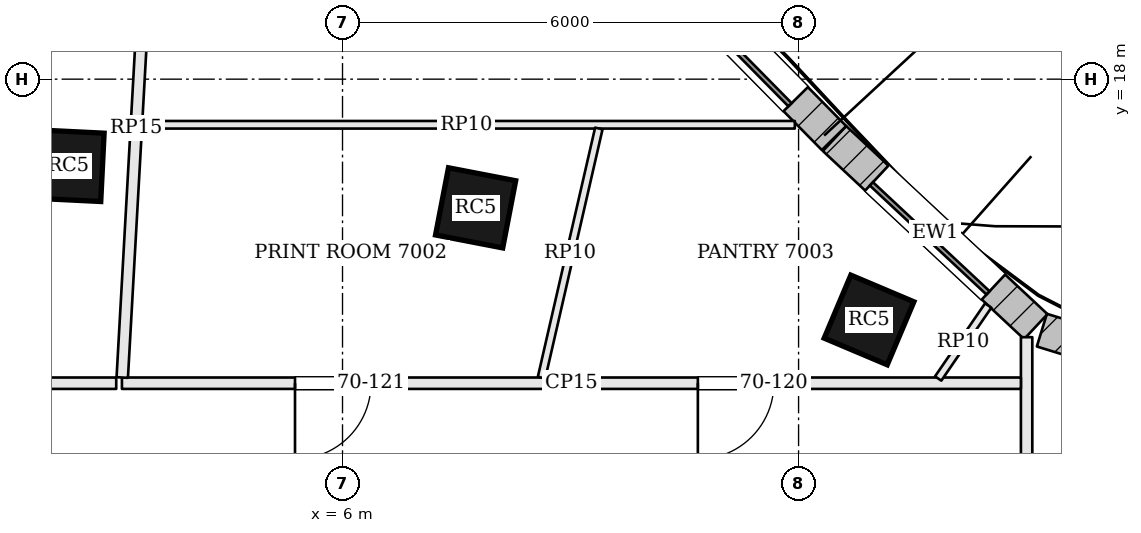
"""IFC4 building model, lengths in metres.
Left out: names, types, materials, properties, quantities, classifications, styles, units other than length and angle.
Written with IfcOpenShell. Run it as: python <this file> out.ifc"""

import sys

from ifc_helpers import new_model, si_unit, direction, frame, frame_2d, origin, origin_2d, place, context, subcontext, project, spatial, rectangle, extrude, element, fill, save


model = new_model("IFC4")
c1 = context("Model", 3, precision=1e-05, world=origin(), true_north=direction((0.0, 1.0)))
c2 = subcontext(c1, "Body", "Model", "MODEL_VIEW")
j1 = project(units=[si_unit("LENGTHUNIT", "METRE"), si_unit("PLANEANGLEUNIT", "RADIAN")], contexts=[c1])
p1 = place(None, origin())
s1 = spatial("IfcSite", under=j1, at=p1, CompositionType="ELEMENT")
p2 = place(p1, origin())
s2 = spatial("IfcBuilding", under=s1, at=p2, CompositionType="ELEMENT")
p3 = place(p2, frame((0.0, 0.0, 284.4)))
s3 = spatial("IfcBuildingStorey", under=s2, at=p3, CompositionType="ELEMENT", Elevation=284.4)
for number, where, z_axis, x_axis in (
    (1, (12.927, 14.832, 0.0), (0.0, 0.0, 1.0), (-0.921, 0.389, 0.0)),
    (2, (7.751, 16.307, 0.0), (0.0, 0.0, 1.0), (-0.982, 0.189, 0.0)),
    (3, (2.392, 16.862, 0.0), (0.0, 0.0, 1.0), (-0.999, 0.049, 0.0)),
):
    element("IfcColumn", number, at=place(p3, frame(where, z_axis=z_axis, x_axis=x_axis)), inside=s3, PredefinedType="COLUMN", context=c2, shape_type="SweptSolid", body=[
        extrude(rectangle(XDim=0.9, YDim=0.9, at=origin_2d()), origin(), (0.0, 0.0, 1.0), 3.9),
    ])
p4 = place(p3, frame((18.958, 13.542, 0.0), z_axis=(0.0, 0.0, 1.0), x_axis=(-0.955792437529, 0.294042201668, 0.0)))
e4 = element("IfcWall", 4, at=p4, inside=s3, PredefinedType="SOLIDWALL", context=c2, shape_type="SweptSolid", body=[
    extrude(rectangle(XDim=3.931, YDim=0.45, at=frame_2d((1.965, 0.0))), origin(), (0.0, 0.0, 1.0), 3.7),
])
p5 = place(p4, frame((0.915, 0.0, 0.9)))
e5 = element("IfcOpeningElement", 5, at=p5, cuts=e4, PredefinedType="OPENING", context=c2, shape_type="SweptSolid", body=[
    extrude(rectangle(XDim=2.1, YDim=2.3, at=frame_2d((1.05, 1.15))), frame((0.0, 0.235, 0.0), z_axis=(0.0, -1.0, 0.0), x_axis=(1.0, 0.0, 0.0)), (0.0, 0.0, 1.0), 0.47),
])
p6 = place(p3, frame((15.121, 14.745, 0.0), z_axis=(0.0, 0.0, 1.0), x_axis=(-0.730618259172, 0.68278617397, 0.0)))
e6 = element("IfcWall", 6, at=p6, inside=s3, PredefinedType="SOLIDWALL", context=c2, shape_type="SweptSolid", body=[
    extrude(rectangle(XDim=3.624, YDim=0.45, at=frame_2d((1.812, 0.0))), origin(), (0.0, 0.0, 1.0), 3.7),
])
p7 = place(p6, frame((0.762, 0.0, 0.9)))
e7 = element("IfcOpeningElement", 7, at=p7, cuts=e6, PredefinedType="OPENING", context=c2, shape_type="SweptSolid", body=[
    extrude(rectangle(XDim=2.1, YDim=2.3, at=frame_2d((1.05, 1.15))), frame((0.0, 0.235, 0.0), z_axis=(0.0, -1.0, 0.0), x_axis=(1.0, 0.0, 0.0)), (0.0, 0.0, 1.0), 0.47),
])
p8 = place(p3, frame((12.466, 17.226, 0.0), z_axis=(0.0, 0.0, 1.0), x_axis=(-0.701875966769, 0.712299183821, 0.0)))
e8 = element("IfcWall", 8, at=p8, inside=s3, PredefinedType="SOLIDWALL", context=c2, shape_type="SweptSolid", body=[
    extrude(rectangle(XDim=3.537, YDim=0.45, at=frame_2d((1.769, 0.0))), origin(), (0.0, 0.0, 1.0), 3.7),
])
p9 = place(p8, frame((0.718, 0.0, 0.9)))
e9 = element("IfcOpeningElement", 9, at=p9, cuts=e8, PredefinedType="OPENING", context=c2, shape_type="SweptSolid", body=[
    extrude(rectangle(XDim=2.1, YDim=2.3, at=frame_2d((1.05, 1.15))), frame((0.0, 0.235, 0.0), z_axis=(0.0, -1.0, 0.0), x_axis=(1.0, 0.0, 0.0)), (0.0, 0.0, 1.0), 0.47),
])
p10 = place(p3, frame((15.0, 7.979, 0.0), z_axis=(0.0, 0.0, 1.0), x_axis=(0.0, 1.0, 0.0)))
e10 = element("IfcWall", 10, at=p10, inside=s3, PredefinedType="PARTITIONING", context=c2, shape_type="SweptSolid", body=[
    extrude(rectangle(XDim=6.626, YDim=0.15, at=frame_2d((3.313, 0.0))), origin(), (0.0, 0.0, 1.0), 3.198),
])
p11 = place(p10, frame((0.759, 0.0, 0.0)))
e11 = element("IfcOpeningElement", 11, at=p11, cuts=e10, PredefinedType="OPENING", context=c2, shape_type="SweptSolid", body=[
    extrude(rectangle(XDim=1.8, YDim=2.1, at=frame_2d((0.9, 1.05))), frame((0.0, 0.085, 0.0), z_axis=(0.0, -1.0, 0.0), x_axis=(1.0, 0.0, 0.0)), (0.0, 0.0, 1.0), 0.17),
])
p12 = place(p3, frame((14.925, 14.0, 0.0), z_axis=(0.0, 0.0, 1.0), x_axis=(-1.0, 0.0, 0.0)))
e12 = element("IfcWall", 12, at=p12, inside=s3, PredefinedType="PARTITIONING", context=c2, shape_type="SweptSolid", body=[
    extrude(rectangle(XDim=11.827, YDim=0.15, at=frame_2d((5.914, 0.0))), origin(), (0.0, 0.0, 1.0), 3.198),
])
p13 = place(p12, frame((3.25, 0.0, 0.0)))
e13 = element("IfcOpeningElement", 13, at=p13, cuts=e12, PredefinedType="OPENING", context=c2, shape_type="SweptSolid", body=[
    extrude(rectangle(XDim=1.0, YDim=2.1, at=frame_2d((0.5, 1.05))), frame((0.0, 0.085, 0.0), z_axis=(0.0, -1.0, 0.0), x_axis=(1.0, 0.0, 0.0)), (0.0, 0.0, 1.0), 0.17),
])
p14 = place(p12, frame((8.55, 0.0, 0.0)))
e14 = element("IfcOpeningElement", 14, at=p14, cuts=e12, PredefinedType="OPENING", context=c2, shape_type="SweptSolid", body=[
    extrude(rectangle(XDim=1.0, YDim=2.1, at=frame_2d((0.5, 1.05))), frame((0.0, 0.085, 0.0), z_axis=(0.0, -1.0, 0.0), x_axis=(1.0, 0.0, 0.0)), (0.0, 0.0, 1.0), 0.17),
])
p15 = place(p3, frame((3.47, 20.638, 0.0), z_axis=(0.0, 0.0, 1.0), x_axis=(-0.055969858851, -0.998432458857, 0.0)))
e15 = element("IfcWall", 15, at=p15, inside=s3, PredefinedType="PARTITIONING", context=c2, shape_type="SweptSolid", body=[
    extrude(rectangle(XDim=6.573, YDim=0.15, at=frame_2d((3.287, 0.0))), origin(), (0.0, 0.0, 1.0), 3.234),
])
p16 = place(p3, frame((3.023, 14.0, 0.0), z_axis=(0.0, 0.0, 1.0), x_axis=(-1.0, 0.0, 0.0)))
e16 = element("IfcWall", 16, at=p16, inside=s3, PredefinedType="PARTITIONING", context=c2, shape_type="SweptSolid", body=[
    extrude(rectangle(XDim=16.684, YDim=0.15, at=frame_2d((8.342, 0.0))), origin(), (0.0, 0.0, 1.0), 3.198),
])
p17 = place(p16, frame((10.628, 0.0, 0.0)))
e17 = element("IfcOpeningElement", 17, at=p17, cuts=e16, PredefinedType="OPENING", context=c2, shape_type="SweptSolid", body=[
    extrude(rectangle(XDim=1.8, YDim=2.1, at=frame_2d((0.9, 1.05))), frame((0.0, 0.085, 0.0), z_axis=(0.0, -1.0, 0.0), x_axis=(1.0, 0.0, 0.0)), (0.0, 0.0, 1.0), 0.17),
])
p18 = place(p3, frame((3.309, 17.4, 0.0), z_axis=(0.0, 0.0, 1.0), x_axis=(1.0, 0.0, 0.0)))
e18 = element("IfcWall", 18, at=p18, inside=s3, PredefinedType="PARTITIONING", context=c2, shape_type="SweptSolid", body=[
    extrude(rectangle(XDim=8.642, YDim=0.1, at=frame_2d((4.321, 0.0))), origin(), (0.0, 0.0, 1.0), 3.198),
])
p19 = place(p3, frame((13.837, 14.062, 0.0), z_axis=(0.0, 0.0, 1.0), x_axis=(0.565495744886, 0.824751212497, 0.0)))
e19 = element("IfcWall", 19, at=p19, inside=s3, PredefinedType="PARTITIONING", context=c2, shape_type="SweptSolid", body=[
    extrude(rectangle(XDim=1.164, YDim=0.1, at=frame_2d((0.582, 0.0))), origin(), (0.0, 0.0, 1.0), 3.198),
])
p20 = place(p3, frame((8.618, 14.073, 0.0), z_axis=(0.0, 0.0, 1.0), x_axis=(0.224048430302, 0.974578011695, 0.0)))
e20 = element("IfcWall", 20, at=p20, inside=s3, PredefinedType="PARTITIONING", context=c2, shape_type="SweptSolid", body=[
    extrude(rectangle(XDim=3.364, YDim=0.1, at=frame_2d((1.682, 0.0))), origin(), (0.0, 0.0, 1.0), 3.198),
])
p21 = place(p7, origin())
e21 = element("IfcWindow", 21, at=p21, inside=s3, PartitioningType="SINGLE_PANEL", PredefinedType="WINDOW", context=c2, shape_type="SweptSolid", body=[
    extrude(rectangle(XDim=2.1, YDim=2.3, at=frame_2d((1.05, 1.15))), frame((0.0, 0.135, 0.0), z_axis=(0.0, -1.0, 0.0), x_axis=(1.0, 0.0, 0.0)), (0.0, 0.0, 1.0), 0.06),
])
fill(e7, e21)
p22 = place(p9, origin())
e22 = element("IfcWindow", 22, at=p22, inside=s3, PartitioningType="SINGLE_PANEL", PredefinedType="WINDOW", context=c2, shape_type="SweptSolid", body=[
    extrude(rectangle(XDim=2.1, YDim=2.3, at=frame_2d((1.05, 1.15))), frame((0.0, 0.135, 0.0), z_axis=(0.0, -1.0, 0.0), x_axis=(1.0, 0.0, 0.0)), (0.0, 0.0, 1.0), 0.06),
])
fill(e9, e22)
p23 = place(p13, origin())
e23 = element("IfcDoor", 23, at=p23, inside=s3, OperationType="SINGLE_SWING_RIGHT", PredefinedType="DOOR", context=c2, shape_type="SweptSolid", body=[
    extrude(rectangle(XDim=1.0, YDim=2.1, at=frame_2d((0.5, 1.05))), frame((0.0, 0.025, 0.0), z_axis=(0.0, -1.0, 0.0), x_axis=(1.0, 0.0, 0.0)), (0.0, 0.0, 1.0), 0.05),
])
fill(e13, e23)
p24 = place(p14, origin())
e24 = element("IfcDoor", 24, at=p24, inside=s3, OperationType="SINGLE_SWING_RIGHT", PredefinedType="DOOR", context=c2, shape_type="SweptSolid", body=[
    extrude(rectangle(XDim=1.0, YDim=2.1, at=frame_2d((0.5, 1.05))), frame((0.0, 0.025, 0.0), z_axis=(0.0, -1.0, 0.0), x_axis=(1.0, 0.0, 0.0)), (0.0, 0.0, 1.0), 0.05),
])
fill(e14, e24)
save(model, sys.argv[1])
